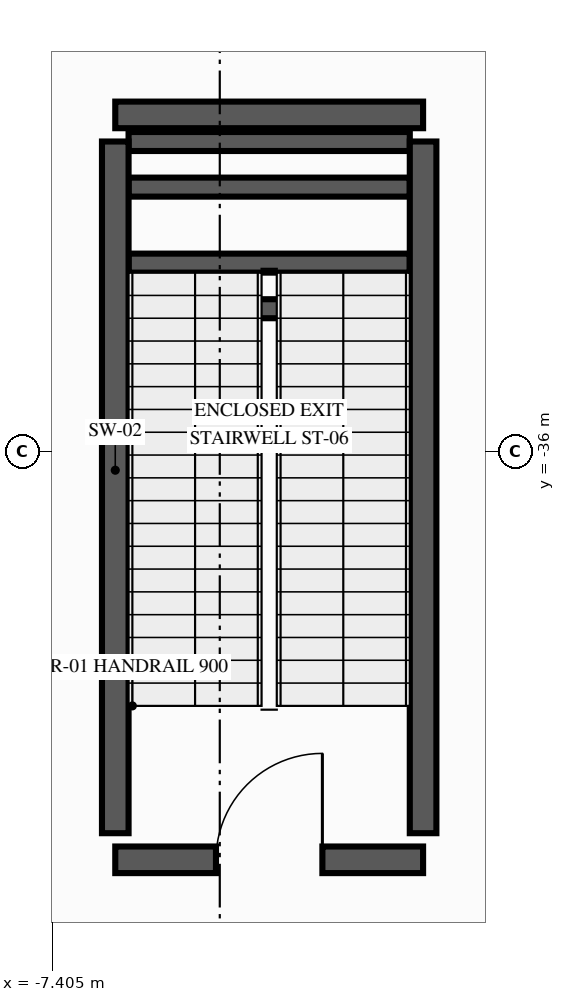
"""IFC4 building model, lengths in metres.
Left out: names, types, materials, properties, quantities, classifications, styles, units other than length and angle.
Written with IfcOpenShell. Run it as: python <this file> out.ifc"""

import sys

from ifc_helpers import new_model, si_unit, direction, frame, frame_2d, origin, place, context, subcontext, project, spatial, rectangle, extrude, element, fill, save


model = new_model("IFC4")
c1 = context("Model", 3, precision=1e-05, world=origin(), true_north=direction((0.0, 1.0)))
c2 = subcontext(c1, "Body", "Model", "MODEL_VIEW")
j1 = project(units=[si_unit("LENGTHUNIT", "METRE"), si_unit("PLANEANGLEUNIT", "RADIAN")], contexts=[c1])
p1 = place(None, origin())
s1 = spatial("IfcSite", under=j1, at=p1, CompositionType="ELEMENT")
p2 = place(p1, origin())
s2 = spatial("IfcBuilding", under=s1, at=p2, CompositionType="ELEMENT")
p3 = place(p2, frame((0.0, 0.0, -6.0)))
s3 = spatial("IfcBuildingStorey", under=s2, at=p3, CompositionType="ELEMENT", Elevation=-6.0)
for number, where, z_axis, x_axis in (
    (1, (-6.4, -33.525, 0.0), (0.0, 0.0, 1.0), (1.0, 0.0, 0.0)),
    (2, (-6.4, -31.925, 0.0), (0.0, 0.0, 1.0), (1.0, 0.0, 0.0)),
):
    element("IfcWall", number, at=place(p3, frame(where, z_axis=z_axis, x_axis=x_axis)), inside=s3, PredefinedType="SHEAR", context=c2, shape_type="SweptSolid", body=[
        extrude(rectangle(XDim=3.7, YDim=0.25, at=frame_2d((1.85, 0.0))), origin(), (0.0, 0.0, 1.0), 2.8),
    ])
for number, where, z_axis, x_axis in (
    (3, (-6.4, -34.125, 0.0), (0.0, 0.0, 1.0), (1.0, 0.0, 0.0)),
    (4, (-6.4, -32.525, 0.0), (0.0, 0.0, 1.0), (1.0, 0.0, 0.0)),
):
    element("IfcWall", number, at=place(p3, frame(where, z_axis=z_axis, x_axis=x_axis)), inside=s3, PredefinedType="SHEAR", context=c2, shape_type="SweptSolid", body=[
        extrude(rectangle(XDim=3.7, YDim=0.25, at=frame_2d((1.85, 0.0))), origin(), (0.0, 0.0, 1.0), 5.7),
    ])
p4 = place(p3, frame((-6.575, -41.375, 0.0), z_axis=(0.0, 0.0, 1.0), x_axis=(1.0, 0.0, 0.0)))
e5 = element("IfcWall", 5, at=p4, inside=s3, PredefinedType="SHEAR", context=c2, shape_type="SweptSolid", body=[
    extrude(rectangle(XDim=4.05, YDim=0.35, at=frame_2d((2.025, 0.0))), origin(), (0.0, 0.0, 1.0), 5.7),
])
p5 = place(p4, frame((1.325, 0.0, 0.0)))
e6 = element("IfcOpeningElement", 6, at=p5, cuts=e5, PredefinedType="OPENING", context=c2, shape_type="SweptSolid", body=[
    extrude(rectangle(XDim=1.4, YDim=2.2, at=frame_2d((0.7, 1.1))), frame((0.0, 0.185, 0.0), z_axis=(0.0, -1.0, 0.0), x_axis=(1.0, 0.0, 0.0)), (0.0, 0.0, 1.0), 0.37),
])
p6 = place(p3, frame((-6.575, -31.575, 0.0), z_axis=(0.0, 0.0, 1.0), x_axis=(1.0, 0.0, 0.0)))
e7 = element("IfcWall", 7, at=p6, inside=s3, PredefinedType="SHEAR", context=c2, shape_type="SweptSolid", body=[
    extrude(rectangle(XDim=4.05, YDim=0.35, at=frame_2d((2.025, 0.0))), origin(), (0.0, 0.0, 1.0), 5.7),
])
for number, where, z_axis, x_axis in (
    (8, (-6.575, -41.025, 0.0), (0.0, 0.0, 1.0), (0.0, 1.0, 0.0)),
    (9, (-2.525, -41.025, 0.0), (0.0, 0.0, 1.0), (0.0, 1.0, 0.0)),
):
    element("IfcWall", number, at=place(p3, frame(where, z_axis=z_axis, x_axis=x_axis)), inside=s3, PredefinedType="SHEAR", context=c2, shape_type="SweptSolid", body=[
        extrude(rectangle(XDim=9.1, YDim=0.35, at=frame_2d((4.55, 0.0))), origin(), (0.0, 0.0, 1.0), 5.7),
    ])
p7 = place(p5, origin())
e10 = element("IfcDoor", 10, at=p7, inside=s3, OperationType="SINGLE_SWING_RIGHT", PredefinedType="DOOR", context=c2, shape_type="SweptSolid", body=[
    extrude(rectangle(XDim=1.4, YDim=2.2, at=frame_2d((0.7, 1.1))), frame((0.0, 0.025, 0.0), z_axis=(0.0, -1.0, 0.0), x_axis=(1.0, 0.0, 0.0)), (0.0, 0.0, 1.0), 0.05),
])
fill(e6, e10)
save(model, sys.argv[1])
